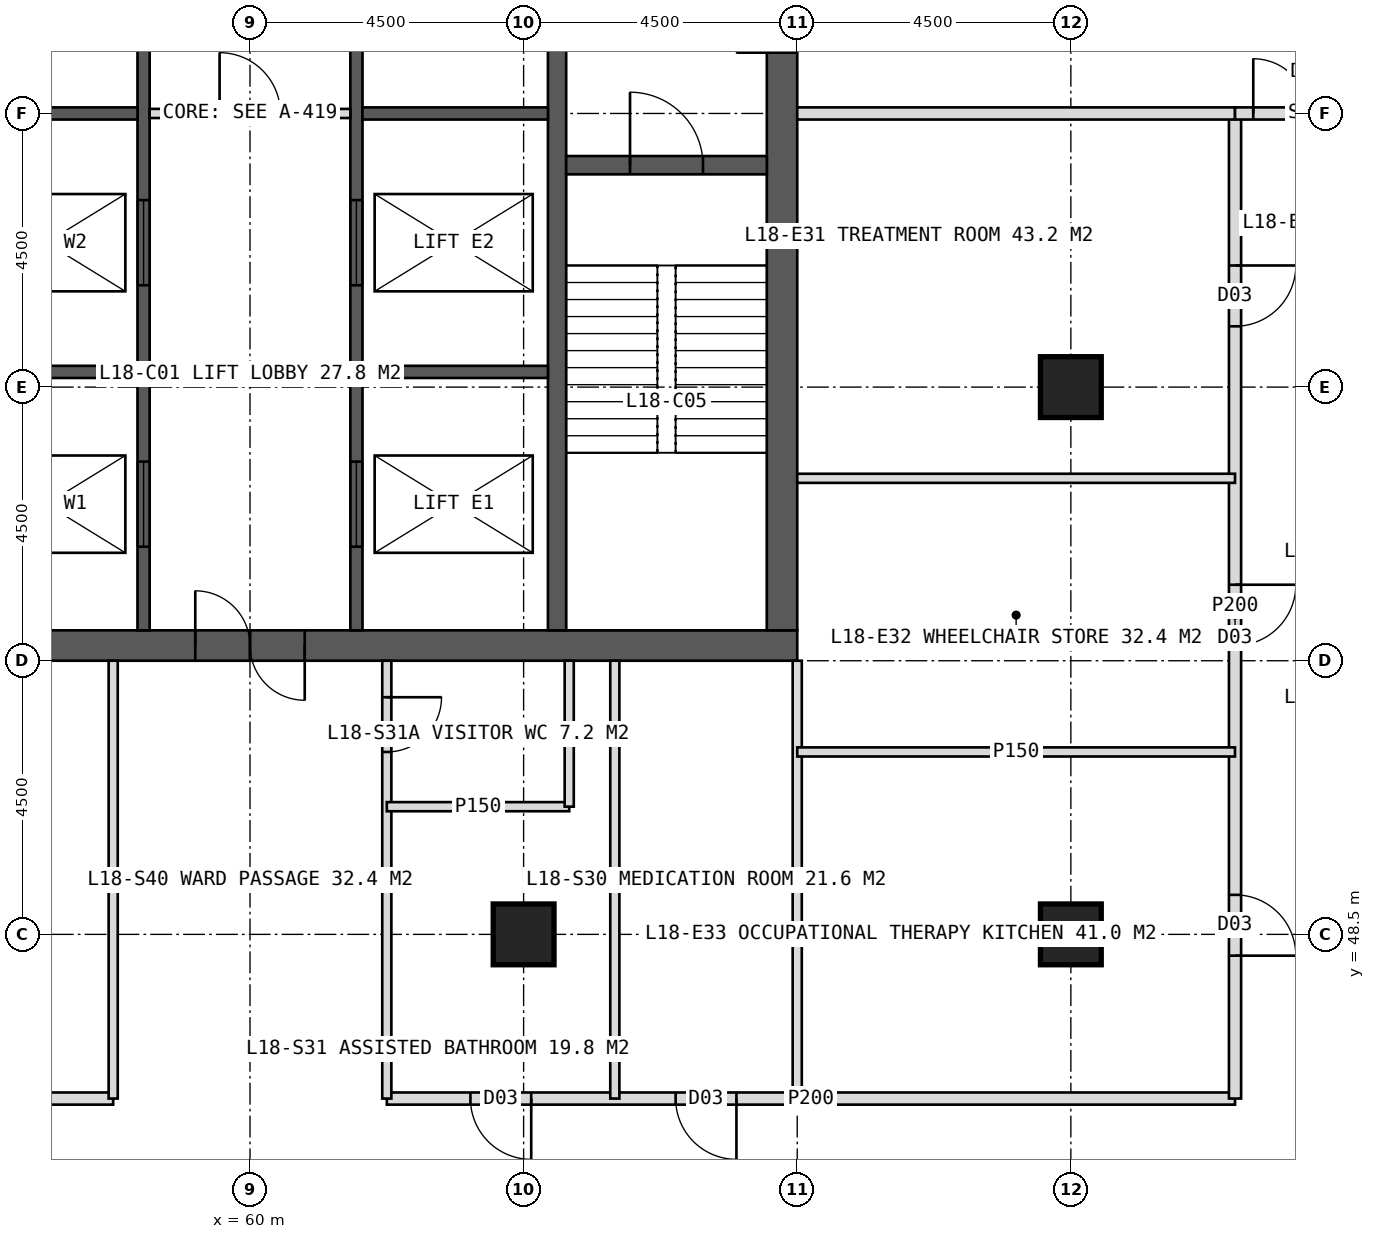
"""IFC4 building model, lengths in metres.
Left out: names, types, materials, properties, quantities, classifications, styles, units other than length and angle.
Written with IfcOpenShell. Run it as: python <this file> out.ifc"""

import sys

from ifc_helpers import new_model, si_unit, direction, frame, frame_2d, origin, origin_2d, place, context, subcontext, project, spatial, rectangle, hollow_rectangle, extrude, element, fill, save


model = new_model("IFC4")
c1 = context("Model", 3, precision=1e-05, world=origin(), true_north=direction((0.0, 1.0)))
c2 = subcontext(c1, "Body", "Model", "MODEL_VIEW")
j1 = project(units=[si_unit("LENGTHUNIT", "METRE"), si_unit("PLANEANGLEUNIT", "RADIAN")], contexts=[c1])
p1 = place(None, origin())
s1 = spatial("IfcSite", under=j1, at=p1, CompositionType="ELEMENT")
p2 = place(p1, origin())
s2 = spatial("IfcBuilding", under=s1, at=p2, CompositionType="ELEMENT")
p3 = place(p2, frame((0.0, 0.0, 79.0)))
s3 = spatial("IfcBuildingStorey", under=s2, at=p3, CompositionType="ELEMENT", Elevation=79.0)
p4 = place(p3, frame((51.0, 53.25, 0.0), z_axis=(0.0, 0.0, 1.0), x_axis=(1.0, 0.0, 0.0)))
e1 = element("IfcWall", 1, at=p4, inside=s3, PredefinedType="SHEAR", context=c2, shape_type="SweptSolid", body=[
    extrude(rectangle(XDim=18.0, YDim=0.5, at=frame_2d((9.0, 0.0))), origin(), (0.0, 0.0, 1.0), 4.0),
])
p5 = place(p4, frame((8.1, 0.0, 0.0)))
e2 = element("IfcOpeningElement", 2, at=p5, cuts=e1, PredefinedType="OPENING", context=c2, shape_type="SweptSolid", body=[
    extrude(rectangle(XDim=1.8, YDim=2.2, at=frame_2d((0.9, 1.1))), frame((0.0, 0.26, 0.0), z_axis=(0.0, -1.0, 0.0), x_axis=(1.0, 0.0, 0.0)), (0.0, 0.0, 1.0), 0.52),
])
p6 = place(p3, frame((68.75, 53.5, 0.0), z_axis=(0.0, 0.0, 1.0), x_axis=(0.0, 1.0, 0.0)))
e3 = element("IfcWall", 3, at=p6, inside=s3, PredefinedType="SHEAR", context=c2, shape_type="SweptSolid", body=[
    extrude(rectangle(XDim=17.0, YDim=0.5, at=frame_2d((8.5, 0.0))), origin(), (0.0, 0.0, 1.0), 4.0),
])
p7 = place(p6, frame((9.5, 0.0, 0.0)))
e4 = element("IfcOpeningElement", 4, at=p7, cuts=e3, PredefinedType="OPENING", context=c2, shape_type="SweptSolid", body=[
    extrude(rectangle(XDim=1.5, YDim=2.2, at=frame_2d((0.75, 1.1))), frame((0.0, 0.26, 0.0), z_axis=(0.0, -1.0, 0.0), x_axis=(1.0, 0.0, 0.0)), (0.0, 0.0, 1.0), 0.52),
])
p8 = place(p3, frame((65.05, 53.5, 0.0), z_axis=(0.0, 0.0, 1.0), x_axis=(0.0, 1.0, 0.0)))
e5 = element("IfcWall", 5, at=p8, inside=s3, PredefinedType="SHEAR", context=c2, shape_type="SweptSolid", body=[
    extrude(rectangle(XDim=17.0, YDim=0.3, at=frame_2d((8.5, 0.0))), origin(), (0.0, 0.0, 1.0), 4.0),
])
p9 = place(p3, frame((58.25, 53.5, 0.0), z_axis=(0.0, 0.0, 1.0), x_axis=(0.0, 1.0, 0.0)))
e6 = element("IfcWall", 6, at=p9, inside=s3, PredefinedType="SHEAR", context=c2, shape_type="SweptSolid", body=[
    extrude(rectangle(XDim=17.0, YDim=0.2, at=frame_2d((8.5, 0.0))), origin(), (0.0, 0.0, 1.0), 4.0),
])
p10 = place(p9, frame((1.375, 0.0, 0.0)))
e7 = element("IfcOpeningElement", 7, at=p10, cuts=e6, PredefinedType="OPENING", context=c2, shape_type="SweptSolid", body=[
    extrude(rectangle(XDim=1.4, YDim=2.2, at=frame_2d((0.7, 1.1))), frame((0.0, 0.11, 0.0), z_axis=(0.0, -1.0, 0.0), x_axis=(1.0, 0.0, 0.0)), (0.0, 0.0, 1.0), 0.22),
])
p11 = place(p9, frame((5.675, 0.0, 0.0)))
e8 = element("IfcOpeningElement", 8, at=p11, cuts=e6, PredefinedType="OPENING", context=c2, shape_type="SweptSolid", body=[
    extrude(rectangle(XDim=1.4, YDim=2.2, at=frame_2d((0.7, 1.1))), frame((0.0, 0.11, 0.0), z_axis=(0.0, -1.0, 0.0), x_axis=(1.0, 0.0, 0.0)), (0.0, 0.0, 1.0), 0.22),
])
p12 = place(p3, frame((61.75, 53.5, 0.0), z_axis=(0.0, 0.0, 1.0), x_axis=(0.0, 1.0, 0.0)))
e9 = element("IfcWall", 9, at=p12, inside=s3, PredefinedType="SHEAR", context=c2, shape_type="SweptSolid", body=[
    extrude(rectangle(XDim=17.0, YDim=0.2, at=frame_2d((8.5, 0.0))), origin(), (0.0, 0.0, 1.0), 4.0),
])
p13 = place(p12, frame((1.375, 0.0, 0.0)))
e10 = element("IfcOpeningElement", 10, at=p13, cuts=e9, PredefinedType="OPENING", context=c2, shape_type="SweptSolid", body=[
    extrude(rectangle(XDim=1.4, YDim=2.2, at=frame_2d((0.7, 1.1))), frame((0.0, 0.11, 0.0), z_axis=(0.0, -1.0, 0.0), x_axis=(1.0, 0.0, 0.0)), (0.0, 0.0, 1.0), 0.22),
])
p14 = place(p12, frame((5.675, 0.0, 0.0)))
e11 = element("IfcOpeningElement", 11, at=p14, cuts=e9, PredefinedType="OPENING", context=c2, shape_type="SweptSolid", body=[
    extrude(rectangle(XDim=1.4, YDim=2.2, at=frame_2d((0.7, 1.1))), frame((0.0, 0.11, 0.0), z_axis=(0.0, -1.0, 0.0), x_axis=(1.0, 0.0, 0.0)), (0.0, 0.0, 1.0), 0.22),
])
for number, where, z_axis, x_axis in (
    (12, (55.1, 57.75, 0.0), (0.0, 0.0, 1.0), (1.0, 0.0, 0.0)),
    (13, (61.85, 57.75, 0.0), (0.0, 0.0, 1.0), (1.0, 0.0, 0.0)),
    (14, (55.1, 62.0, 0.0), (0.0, 0.0, 1.0), (1.0, 0.0, 0.0)),
    (15, (61.85, 62.0, 0.0), (0.0, 0.0, 1.0), (1.0, 0.0, 0.0)),
):
    element("IfcWall", number, at=place(p3, frame(where, z_axis=z_axis, x_axis=x_axis)), inside=s3, PredefinedType="SHEAR", context=c2, shape_type="SweptSolid", body=[
        extrude(rectangle(XDim=3.05, YDim=0.2, at=frame_2d((1.525, 0.0))), origin(), (0.0, 0.0, 1.0), 4.0),
    ])
p15 = place(p3, frame((65.2, 61.15, 0.0), z_axis=(0.0, 0.0, 1.0), x_axis=(1.0, 0.0, 0.0)))
e16 = element("IfcWall", 16, at=p15, inside=s3, PredefinedType="SHEAR", context=c2, shape_type="SweptSolid", body=[
    extrude(rectangle(XDim=3.3, YDim=0.3, at=frame_2d((1.65, 0.0))), origin(), (0.0, 0.0, 1.0), 4.0),
])
p16 = place(p15, frame((1.05, 0.0, 0.0)))
e17 = element("IfcOpeningElement", 17, at=p16, cuts=e16, PredefinedType="OPENING", context=c2, shape_type="SweptSolid", body=[
    extrude(rectangle(XDim=1.2, YDim=2.1, at=frame_2d((0.6, 1.05))), frame((0.0, 0.16, 0.0), z_axis=(0.0, -1.0, 0.0), x_axis=(1.0, 0.0, 0.0)), (0.0, 0.0, 1.0), 0.32),
])
for number, where, z_axis, x_axis in (
    (18, (73.5, 48.5, 0.0), (0.0, 0.0, 1.0), (1.0, 0.0, 0.0)),
    (19, (64.5, 48.5, 0.0), (0.0, 0.0, 1.0), (1.0, 0.0, 0.0)),
    (20, (73.5, 57.5, 0.0), (0.0, 0.0, 1.0), (1.0, 0.0, 0.0)),
):
    element("IfcColumn", number, at=place(p3, frame(where, z_axis=z_axis, x_axis=x_axis)), inside=s3, PredefinedType="COLUMN", context=c2, shape_type="SweptSolid", body=[
        extrude(hollow_rectangle(XDim=1.0, YDim=1.0, WallThickness=0.1, at=origin_2d()), origin(), (0.0, 0.0, 1.0), 4.0),
    ])
p17 = place(p3, frame((69.0, 53.0, 0.0), z_axis=(0.0, 0.0, 1.0), x_axis=(0.0, -1.0, 0.0)))
e21 = element("IfcWall", 21, at=p17, inside=s3, PredefinedType="PARTITIONING", context=c2, shape_type="SweptSolid", body=[
    extrude(rectangle(XDim=7.2, YDim=0.15, at=frame_2d((3.6, 0.0))), origin(), (0.0, 0.0, 1.0), 3.75),
])
p18 = place(p3, frame((76.2, 45.8, 0.0), z_axis=(0.0, 0.0, 1.0), x_axis=(-1.0, 0.0, 0.0)))
e22 = element("IfcWall", 22, at=p18, inside=s3, PredefinedType="PARTITIONING", context=c2, shape_type="SweptSolid", body=[
    extrude(rectangle(XDim=13.95, YDim=0.2, at=frame_2d((6.975, 0.0))), origin(), (0.0, 0.0, 1.0), 3.75),
])
p19 = place(p18, frame((8.2, 0.0, 0.0)))
e23 = element("IfcOpeningElement", 23, at=p19, cuts=e22, PredefinedType="OPENING", context=c2, shape_type="SweptSolid", body=[
    extrude(rectangle(XDim=1.0, YDim=2.1, at=frame_2d((0.5, 1.05))), frame((0.0, 0.11, 0.0), z_axis=(0.0, -1.0, 0.0), x_axis=(1.0, 0.0, 0.0)), (0.0, 0.0, 1.0), 0.22),
])
p20 = place(p18, frame((11.575, 0.0, 0.0)))
e24 = element("IfcOpeningElement", 24, at=p20, cuts=e22, PredefinedType="OPENING", context=c2, shape_type="SweptSolid", body=[
    extrude(rectangle(XDim=1.0, YDim=2.1, at=frame_2d((0.5, 1.05))), frame((0.0, 0.11, 0.0), z_axis=(0.0, -1.0, 0.0), x_axis=(1.0, 0.0, 0.0)), (0.0, 0.0, 1.0), 0.22),
])
p21 = place(p3, frame((57.75, 45.8, 0.0), z_axis=(0.0, 0.0, 1.0), x_axis=(-1.0, 0.0, 0.0)))
e25 = element("IfcWall", 25, at=p21, inside=s3, PredefinedType="PARTITIONING", context=c2, shape_type="SweptSolid", body=[
    extrude(rectangle(XDim=13.95, YDim=0.2, at=frame_2d((6.975, 0.0))), origin(), (0.0, 0.0, 1.0), 3.75),
])
p22 = place(p21, frame((3.625, 0.0, 0.0)))
e26 = element("IfcOpeningElement", 26, at=p22, cuts=e25, PredefinedType="OPENING", context=c2, shape_type="SweptSolid", body=[
    extrude(rectangle(XDim=1.0, YDim=2.1, at=frame_2d((0.5, 1.05))), frame((0.0, 0.11, 0.0), z_axis=(0.0, -1.0, 0.0), x_axis=(1.0, 0.0, 0.0)), (0.0, 0.0, 1.0), 0.22),
])
p23 = place(p21, frame((10.6, 0.0, 0.0)))
e27 = element("IfcOpeningElement", 27, at=p23, cuts=e25, PredefinedType="OPENING", context=c2, shape_type="SweptSolid", body=[
    extrude(rectangle(XDim=1.0, YDim=2.1, at=frame_2d((0.5, 1.05))), frame((0.0, 0.11, 0.0), z_axis=(0.0, -1.0, 0.0), x_axis=(1.0, 0.0, 0.0)), (0.0, 0.0, 1.0), 0.22),
])
p24 = place(p3, frame((62.25, 53.0, 0.0), z_axis=(0.0, 0.0, 1.0), x_axis=(0.0, -1.0, 0.0)))
e28 = element("IfcWall", 28, at=p24, inside=s3, PredefinedType="PARTITIONING", context=c2, shape_type="SweptSolid", body=[
    extrude(rectangle(XDim=7.2, YDim=0.15, at=frame_2d((3.6, 0.0))), origin(), (0.0, 0.0, 1.0), 3.75),
])
p25 = place(p24, frame((0.6, 0.0, 0.0)))
e29 = element("IfcOpeningElement", 29, at=p25, cuts=e28, PredefinedType="OPENING", context=c2, shape_type="SweptSolid", body=[
    extrude(rectangle(XDim=0.9, YDim=2.1, at=frame_2d((0.45, 1.05))), frame((0.0, 0.085, 0.0), z_axis=(0.0, -1.0, 0.0), x_axis=(1.0, 0.0, 0.0)), (0.0, 0.0, 1.0), 0.17),
])
for number, where, z_axis, x_axis in (
    (30, (57.75, 53.0, 0.0), (0.0, 0.0, 1.0), (0.0, -1.0, 0.0)),
    (31, (66.0, 53.0, 0.0), (0.0, 0.0, 1.0), (0.0, -1.0, 0.0)),
):
    element("IfcWall", number, at=place(p3, frame(where, z_axis=z_axis, x_axis=x_axis)), inside=s3, PredefinedType="PARTITIONING", context=c2, shape_type="SweptSolid", body=[
        extrude(rectangle(XDim=7.2, YDim=0.15, at=frame_2d((3.6, 0.0))), origin(), (0.0, 0.0, 1.0), 3.75),
    ])
p26 = place(p3, frame((65.25, 50.6, 0.0), z_axis=(0.0, 0.0, 1.0), x_axis=(-1.0, 0.0, 0.0)))
e32 = element("IfcWall", 32, at=p26, inside=s3, PredefinedType="PARTITIONING", context=c2, shape_type="SweptSolid", body=[
    extrude(rectangle(XDim=3.0, YDim=0.15, at=frame_2d((1.5, 0.0))), origin(), (0.0, 0.0, 1.0), 3.75),
])
p27 = place(p3, frame((65.25, 53.0, 0.0), z_axis=(0.0, 0.0, 1.0), x_axis=(0.0, -1.0, 0.0)))
e33 = element("IfcWall", 33, at=p27, inside=s3, PredefinedType="PARTITIONING", context=c2, shape_type="SweptSolid", body=[
    extrude(rectangle(XDim=2.4, YDim=0.15, at=frame_2d((1.2, 0.0))), origin(), (0.0, 0.0, 1.0), 3.75),
])
p28 = place(p3, frame((76.2, 62.0, 0.0), z_axis=(0.0, 0.0, 1.0), x_axis=(0.0, -1.0, 0.0)))
e34 = element("IfcWall", 34, at=p28, inside=s3, PredefinedType="PARTITIONING", context=c2, shape_type="SweptSolid", body=[
    extrude(rectangle(XDim=16.2, YDim=0.2, at=frame_2d((8.1, 0.0))), origin(), (0.0, 0.0, 1.0), 3.75),
])
p29 = place(p28, frame((2.5, 0.0, 0.0)))
e35 = element("IfcOpeningElement", 35, at=p29, cuts=e34, PredefinedType="OPENING", context=c2, shape_type="SweptSolid", body=[
    extrude(rectangle(XDim=1.0, YDim=2.1, at=frame_2d((0.5, 1.05))), frame((0.0, 0.11, 0.0), z_axis=(0.0, -1.0, 0.0), x_axis=(1.0, 0.0, 0.0)), (0.0, 0.0, 1.0), 0.22),
])
p30 = place(p28, frame((7.75, 0.0, 0.0)))
e36 = element("IfcOpeningElement", 36, at=p30, cuts=e34, PredefinedType="OPENING", context=c2, shape_type="SweptSolid", body=[
    extrude(rectangle(XDim=1.0, YDim=2.1, at=frame_2d((0.5, 1.05))), frame((0.0, 0.11, 0.0), z_axis=(0.0, -1.0, 0.0), x_axis=(1.0, 0.0, 0.0)), (0.0, 0.0, 1.0), 0.22),
])
p31 = place(p28, frame((12.85, 0.0, 0.0)))
e37 = element("IfcOpeningElement", 37, at=p31, cuts=e34, PredefinedType="OPENING", context=c2, shape_type="SweptSolid", body=[
    extrude(rectangle(XDim=1.0, YDim=2.1, at=frame_2d((0.5, 1.05))), frame((0.0, 0.11, 0.0), z_axis=(0.0, -1.0, 0.0), x_axis=(1.0, 0.0, 0.0)), (0.0, 0.0, 1.0), 0.22),
])
p32 = place(p3, frame((69.0, 62.0, 0.0), z_axis=(0.0, 0.0, 1.0), x_axis=(1.0, 0.0, 0.0)))
e38 = element("IfcWall", 38, at=p32, inside=s3, PredefinedType="SOLIDWALL", context=c2, shape_type="SweptSolid", body=[
    extrude(rectangle(XDim=7.2, YDim=0.2, at=frame_2d((3.6, 0.0))), origin(), (0.0, 0.0, 1.0), 2.75),
])
for number, where, z_axis, x_axis in (
    (39, (69.0, 56.0, 0.0), (0.0, 0.0, 1.0), (1.0, 0.0, 0.0)),
    (40, (69.0, 51.5, 0.0), (0.0, 0.0, 1.0), (1.0, 0.0, 0.0)),
):
    element("IfcWall", number, at=place(p3, frame(where, z_axis=z_axis, x_axis=x_axis)), inside=s3, PredefinedType="PARTITIONING", context=c2, shape_type="SweptSolid", body=[
        extrude(rectangle(XDim=7.2, YDim=0.15, at=frame_2d((3.6, 0.0))), origin(), (0.0, 0.0, 1.0), 3.75),
    ])
p33 = place(p3, frame((76.2, 62.0, 0.0), z_axis=(0.0, 0.0, 1.0), x_axis=(1.0, 0.0, 0.0)))
e41 = element("IfcWall", 41, at=p33, inside=s3, PredefinedType="SOLIDWALL", context=c2, shape_type="SweptSolid", body=[
    extrude(rectangle(XDim=2.7, YDim=0.2, at=frame_2d((1.35, 0.0))), origin(), (0.0, 0.0, 1.0), 2.75),
])
p34 = place(p33, frame((0.3, 0.0, 0.0)))
e42 = element("IfcOpeningElement", 42, at=p34, cuts=e41, PredefinedType="OPENING", context=c2, shape_type="SweptSolid", body=[
    extrude(rectangle(XDim=1.8, YDim=2.2, at=frame_2d((0.9, 1.1))), frame((0.0, 0.11, 0.0), z_axis=(0.0, -1.0, 0.0), x_axis=(1.0, 0.0, 0.0)), (0.0, 0.0, 1.0), 0.22),
])
p35 = place(p3, frame((58.35, 62.0, 0.0), z_axis=(0.0, 0.0, 1.0), x_axis=(1.0, 0.0, 0.0)))
e43 = element("IfcWall", 43, at=p35, inside=s3, PredefinedType="PARTITIONING", context=c2, shape_type="SweptSolid", body=[
    extrude(rectangle(XDim=3.3, YDim=0.15, at=frame_2d((1.65, 0.0))), origin(), (0.0, 0.0, 1.0), 3.75),
])
p36 = place(p35, frame((1.15, 0.0, 0.0)))
e44 = element("IfcOpeningElement", 44, at=p36, cuts=e43, PredefinedType="OPENING", context=c2, shape_type="SweptSolid", body=[
    extrude(rectangle(XDim=1.0, YDim=2.1, at=frame_2d((0.5, 1.05))), frame((0.0, 0.085, 0.0), z_axis=(0.0, -1.0, 0.0), x_axis=(1.0, 0.0, 0.0)), (0.0, 0.0, 1.0), 0.17),
])
p37 = place(p19, origin())
e45 = element("IfcDoor", 45, at=p37, inside=s3, OperationType="SINGLE_SWING_LEFT", PredefinedType="DOOR", context=c2, shape_type="SweptSolid", body=[
    extrude(rectangle(XDim=1.0, YDim=2.1, at=frame_2d((0.5, 1.05))), frame((0.0, 0.025, 0.0), z_axis=(0.0, -1.0, 0.0), x_axis=(1.0, 0.0, 0.0)), (0.0, 0.0, 1.0), 0.05),
])
fill(e23, e45)
p38 = place(p25, origin())
e46 = element("IfcDoor", 46, at=p38, inside=s3, OperationType="SINGLE_SWING_LEFT", PredefinedType="DOOR", context=c2, shape_type="SweptSolid", body=[
    extrude(rectangle(XDim=0.9, YDim=2.1, at=frame_2d((0.45, 1.05))), frame((0.0, 0.025, 0.0), z_axis=(0.0, -1.0, 0.0), x_axis=(1.0, 0.0, 0.0)), (0.0, 0.0, 1.0), 0.05),
])
fill(e29, e46)
p39 = place(p20, origin())
e47 = element("IfcDoor", 47, at=p39, inside=s3, OperationType="SINGLE_SWING_LEFT", PredefinedType="DOOR", context=c2, shape_type="SweptSolid", body=[
    extrude(rectangle(XDim=1.0, YDim=2.1, at=frame_2d((0.5, 1.05))), frame((0.0, 0.025, 0.0), z_axis=(0.0, -1.0, 0.0), x_axis=(1.0, 0.0, 0.0)), (0.0, 0.0, 1.0), 0.05),
])
fill(e24, e47)
p40 = place(p29, origin())
e48 = element("IfcDoor", 48, at=p40, inside=s3, OperationType="SINGLE_SWING_LEFT", PredefinedType="DOOR", context=c2, shape_type="SweptSolid", body=[
    extrude(rectangle(XDim=1.0, YDim=2.1, at=frame_2d((0.5, 1.05))), frame((0.0, 0.025, 0.0), z_axis=(0.0, -1.0, 0.0), x_axis=(1.0, 0.0, 0.0)), (0.0, 0.0, 1.0), 0.05),
])
fill(e35, e48)
p41 = place(p30, origin())
e49 = element("IfcDoor", 49, at=p41, inside=s3, OperationType="SINGLE_SWING_LEFT", PredefinedType="DOOR", context=c2, shape_type="SweptSolid", body=[
    extrude(rectangle(XDim=1.0, YDim=2.1, at=frame_2d((0.5, 1.05))), frame((0.0, 0.025, 0.0), z_axis=(0.0, -1.0, 0.0), x_axis=(1.0, 0.0, 0.0)), (0.0, 0.0, 1.0), 0.05),
])
fill(e36, e49)
p42 = place(p31, origin())
e50 = element("IfcDoor", 50, at=p42, inside=s3, OperationType="SINGLE_SWING_RIGHT", PredefinedType="DOOR", context=c2, shape_type="SweptSolid", body=[
    extrude(rectangle(XDim=1.0, YDim=2.1, at=frame_2d((0.5, 1.05))), frame((0.0, 0.025, 0.0), z_axis=(0.0, -1.0, 0.0), x_axis=(1.0, 0.0, 0.0)), (0.0, 0.0, 1.0), 0.05),
])
fill(e37, e50)
p43 = place(p34, origin())
e51 = element("IfcDoor", 51, at=p43, inside=s3, OperationType="DOUBLE_DOOR_DOUBLE_SWING", PredefinedType="DOOR", context=c2, shape_type="SweptSolid", body=[
    extrude(rectangle(XDim=1.8, YDim=2.2, at=frame_2d((0.9, 1.1))), frame((0.0, 0.025, 0.0), z_axis=(0.0, -1.0, 0.0), x_axis=(1.0, 0.0, 0.0)), (0.0, 0.0, 1.0), 0.05),
])
fill(e42, e51)
p44 = place(p5, origin())
e52 = element("IfcDoor", 52, at=p44, inside=s3, OperationType="DOUBLE_DOOR_SINGLE_SWING", PredefinedType="DOOR", context=c2, shape_type="SweptSolid", body=[
    extrude(rectangle(XDim=1.8, YDim=2.2, at=frame_2d((0.9, 1.1))), frame((0.0, 0.025, 0.0), z_axis=(0.0, -1.0, 0.0), x_axis=(1.0, 0.0, 0.0)), (0.0, 0.0, 1.0), 0.05),
])
fill(e2, e52)
p45 = place(p16, origin())
e53 = element("IfcDoor", 53, at=p45, inside=s3, OperationType="SINGLE_SWING_LEFT", PredefinedType="DOOR", context=c2, shape_type="SweptSolid", body=[
    extrude(rectangle(XDim=1.2, YDim=2.1, at=frame_2d((0.6, 1.05))), frame((0.0, 0.025, 0.0), z_axis=(0.0, -1.0, 0.0), x_axis=(1.0, 0.0, 0.0)), (0.0, 0.0, 1.0), 0.05),
])
fill(e17, e53)
p46 = place(p10, origin())
e54 = element("IfcDoor", 54, at=p46, inside=s3, OperationType="SLIDING_TO_LEFT", PredefinedType="DOOR", context=c2, shape_type="SweptSolid", body=[
    extrude(rectangle(XDim=1.4, YDim=2.2, at=frame_2d((0.7, 1.1))), frame((0.0, 0.025, 0.0), z_axis=(0.0, -1.0, 0.0), x_axis=(1.0, 0.0, 0.0)), (0.0, 0.0, 1.0), 0.05),
])
fill(e7, e54)
p47 = place(p13, origin())
e55 = element("IfcDoor", 55, at=p47, inside=s3, OperationType="SLIDING_TO_LEFT", PredefinedType="DOOR", context=c2, shape_type="SweptSolid", body=[
    extrude(rectangle(XDim=1.4, YDim=2.2, at=frame_2d((0.7, 1.1))), frame((0.0, 0.025, 0.0), z_axis=(0.0, -1.0, 0.0), x_axis=(1.0, 0.0, 0.0)), (0.0, 0.0, 1.0), 0.05),
])
fill(e10, e55)
p48 = place(p11, origin())
e56 = element("IfcDoor", 56, at=p48, inside=s3, OperationType="SLIDING_TO_LEFT", PredefinedType="DOOR", context=c2, shape_type="SweptSolid", body=[
    extrude(rectangle(XDim=1.4, YDim=2.2, at=frame_2d((0.7, 1.1))), frame((0.0, 0.025, 0.0), z_axis=(0.0, -1.0, 0.0), x_axis=(1.0, 0.0, 0.0)), (0.0, 0.0, 1.0), 0.05),
])
fill(e8, e56)
p49 = place(p14, origin())
e57 = element("IfcDoor", 57, at=p49, inside=s3, OperationType="SLIDING_TO_LEFT", PredefinedType="DOOR", context=c2, shape_type="SweptSolid", body=[
    extrude(rectangle(XDim=1.4, YDim=2.2, at=frame_2d((0.7, 1.1))), frame((0.0, 0.025, 0.0), z_axis=(0.0, -1.0, 0.0), x_axis=(1.0, 0.0, 0.0)), (0.0, 0.0, 1.0), 0.05),
])
fill(e11, e57)
p50 = place(p36, origin())
e58 = element("IfcDoor", 58, at=p50, inside=s3, OperationType="SINGLE_SWING_LEFT", PredefinedType="DOOR", context=c2, shape_type="SweptSolid", body=[
    extrude(rectangle(XDim=1.0, YDim=2.1, at=frame_2d((0.5, 1.05))), frame((0.0, 0.025, 0.0), z_axis=(0.0, -1.0, 0.0), x_axis=(1.0, 0.0, 0.0)), (0.0, 0.0, 1.0), 0.05),
])
fill(e44, e58)
save(model, sys.argv[1])
